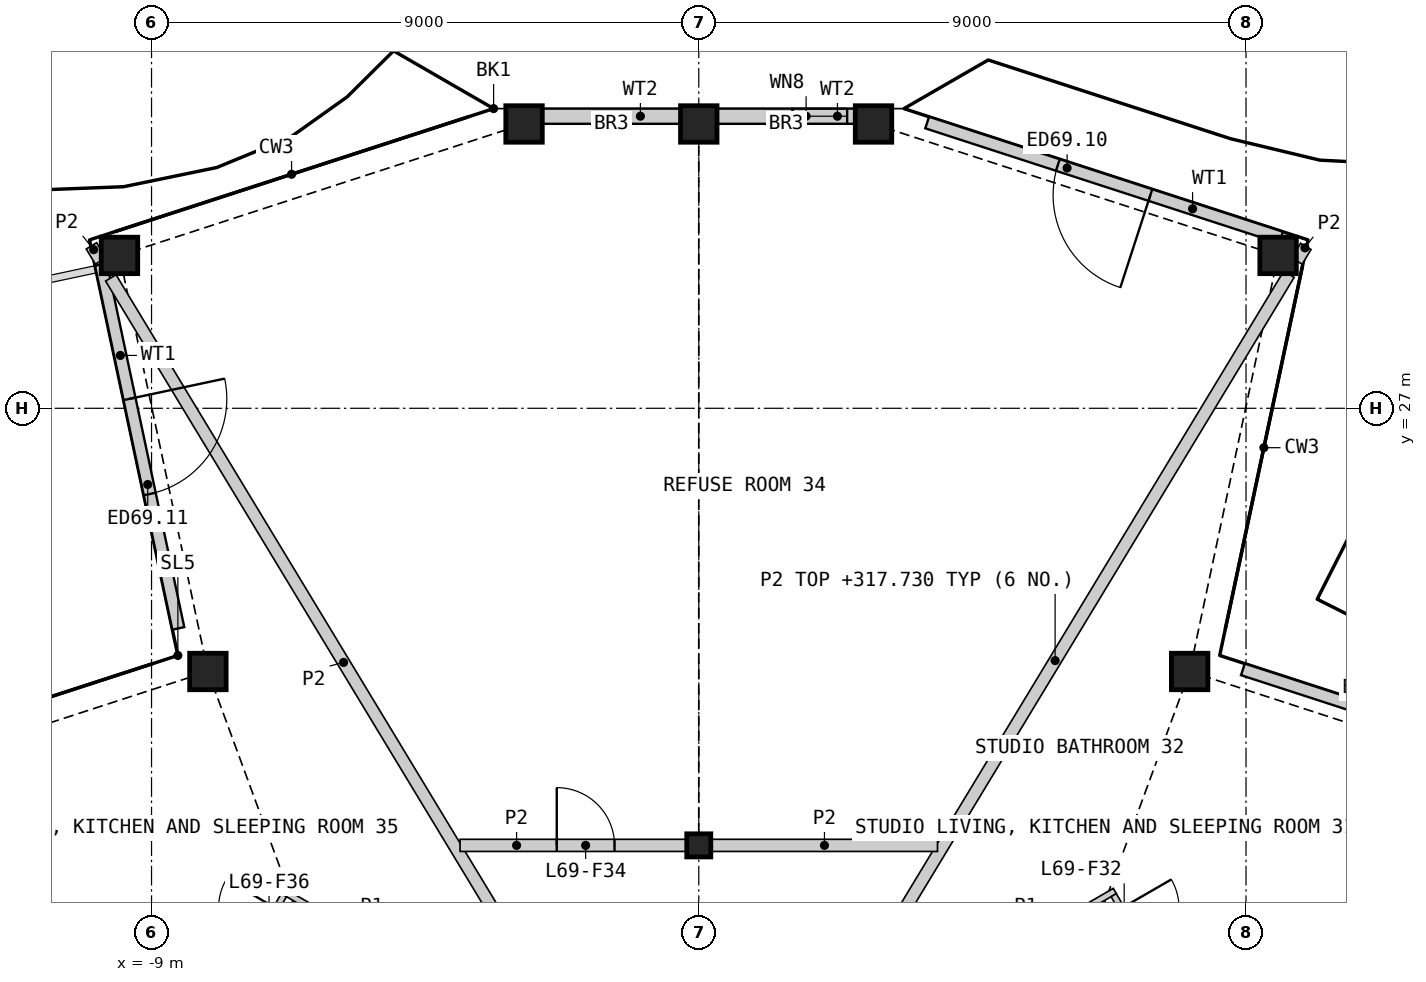
"""IFC4 building model, lengths in metres.
Left out: names, types, materials, properties, quantities, classifications, styles, units other than length and angle.
Written with IfcOpenShell. Run it as: python <this file> out.ifc"""

import sys

from ifc_helpers import new_model, si_unit, direction, frame, frame_2d, origin, origin_2d, place, context, subcontext, project, spatial, rectangle, hollow_rectangle, i_section, extrude, element, fill, save


model = new_model("IFC4")
c1 = context("Model", 3, precision=1e-05, world=origin(), true_north=direction((0.0, 1.0)))
c2 = subcontext(c1, "Body", "Model", "MODEL_VIEW")
j1 = project(units=[si_unit("LENGTHUNIT", "METRE"), si_unit("PLANEANGLEUNIT", "RADIAN")], contexts=[c1])
p1 = place(None, origin())
s1 = spatial("IfcSite", under=j1, at=p1, CompositionType="ELEMENT")
p2 = place(p1, origin())
s2 = spatial("IfcBuilding", under=s1, at=p2, CompositionType="ELEMENT")
p3 = place(p2, frame((0.0, 0.0, 315.4)))
s3 = spatial("IfcBuildingStorey", under=s2, at=p3, CompositionType="ELEMENT", Elevation=315.4)
for number, where, z_axis, x_axis in (
    (1, (8.073, 22.671, 0.0), (0.0, 0.0, 1.0), (1.0, 0.0, 0.0)),
    (2, (9.527, 29.514, 0.0), (0.0, 0.0, 1.0), (1.0, 0.0, 0.0)),
    (3, (2.874, 31.676, 0.0), (0.0, 0.0, 1.0), (1.0, 0.0, 0.0)),
    (4, (0.0, 31.676, 0.0), (0.0, 0.0, 1.0), (1.0, 0.0, 0.0)),
    (5, (-2.874, 31.676, 0.0), (0.0, 0.0, 1.0), (1.0, 0.0, 0.0)),
    (6, (-9.527, 29.514, 0.0), (0.0, 0.0, 1.0), (1.0, 0.0, 0.0)),
    (7, (-8.073, 22.671, 0.0), (0.0, 0.0, 1.0), (1.0, 0.0, 0.0)),
):
    element("IfcColumn", number, at=place(p3, frame(where, z_axis=z_axis, x_axis=x_axis)), inside=s3, PredefinedType="COLUMN", context=c2, shape_type="SweptSolid", body=[
        extrude(hollow_rectangle(XDim=0.6, YDim=0.6, WallThickness=0.04, at=origin_2d()), origin(), (0.0, 0.0, 1.0), 3.4),
    ])
p4 = place(p3, frame((0.0, 19.811, 0.0), z_axis=(0.0, 0.0, 1.0), x_axis=(1.0, 0.0, 0.0)))
e8 = element("IfcColumn", 8, at=p4, inside=s3, PredefinedType="COLUMN", context=c2, shape_type="SweptSolid", body=[
    extrude(i_section(OverallWidth=0.396, OverallDepth=0.381, WebThickness=0.019, FlangeThickness=0.03, at=origin_2d()), origin(), (0.0, 0.0, 1.0), 3.4),
])
p5 = place(p3, frame((14.769, 20.814, 0.0), z_axis=(0.0, 0.0, 1.0), x_axis=(-0.951069243123, 0.308977822483, 0.0)))
e9 = element("IfcWall", 9, at=p5, inside=s3, PredefinedType="SOLIDWALL", context=c2, shape_type="SweptSolid", body=[
    extrude(rectangle(XDim=6.12, YDim=0.2, at=frame_2d((3.06, 0.0))), origin(), (0.0, 0.0, 1.0), 2.488),
])
p6 = place(p5, frame((2.26, 0.0, 0.0)))
e10 = element("IfcOpeningElement", 10, at=p6, cuts=e9, PredefinedType="OPENING", context=c2, shape_type="SweptSolid", body=[
    extrude(rectangle(XDim=1.6, YDim=2.25, at=frame_2d((0.8, 1.125))), frame((0.0, 0.11, 0.0), z_axis=(0.0, -1.0, 0.0), x_axis=(1.0, 0.0, 0.0)), (0.0, 0.0, 1.0), 0.22),
])
p7 = place(p3, frame((9.576, 29.809, 0.0), z_axis=(0.0, 0.0, 1.0), x_axis=(-0.951053709789, 0.309025631781, 0.0)))
e11 = element("IfcWall", 11, at=p7, inside=s3, PredefinedType="SOLIDWALL", context=c2, shape_type="SweptSolid", body=[
    extrude(rectangle(XDim=6.12, YDim=0.2, at=frame_2d((3.06, 0.0))), origin(), (0.0, 0.0, 1.0), 2.488),
])
p8 = place(p7, frame((2.26, 0.0, 0.0)))
e12 = element("IfcOpeningElement", 12, at=p8, cuts=e11, PredefinedType="OPENING", context=c2, shape_type="SweptSolid", body=[
    extrude(rectangle(XDim=1.6, YDim=2.25, at=frame_2d((0.8, 1.125))), frame((0.0, 0.11, 0.0), z_axis=(0.0, -1.0, 0.0), x_axis=(1.0, 0.0, 0.0)), (0.0, 0.0, 1.0), 0.22),
])
p9 = place(p3, frame((2.94, 31.804, 0.0), z_axis=(0.0, 0.0, 1.0), x_axis=(-1.0, 0.0, 0.0)))
e13 = element("IfcWall", 13, at=p9, inside=s3, PredefinedType="SOLIDWALL", context=c2, shape_type="SweptSolid", body=[
    extrude(rectangle(XDim=2.64, YDim=0.25, at=frame_2d((1.32, 0.0))), origin(), (0.0, 0.0, 1.0), 2.488),
])
p10 = place(p9, frame((0.5, 0.0, 1.5)))
e14 = element("IfcOpeningElement", 14, at=p10, cuts=e13, PredefinedType="OPENING", context=c2, shape_type="SweptSolid", body=[
    extrude(rectangle(XDim=0.9, YDim=0.7, at=frame_2d((0.45, 0.35))), frame((0.0, 0.135, 0.0), z_axis=(0.0, -1.0, 0.0), x_axis=(1.0, 0.0, 0.0)), (0.0, 0.0, 1.0), 0.27),
])
p11 = place(p3, frame((-0.3, 31.804, 0.0), z_axis=(0.0, 0.0, 1.0), x_axis=(-1.0, 0.0, 0.0)))
e15 = element("IfcWall", 15, at=p11, inside=s3, PredefinedType="SOLIDWALL", context=c2, shape_type="SweptSolid", body=[
    extrude(rectangle(XDim=2.64, YDim=0.25, at=frame_2d((1.32, 0.0))), origin(), (0.0, 0.0, 1.0), 2.488),
])
p12 = place(p3, frame((-9.832, 29.366, 0.0), z_axis=(0.0, 0.0, 1.0), x_axis=(0.207932234858, -0.978143233738, 0.0)))
e16 = element("IfcWall", 16, at=p12, inside=s3, PredefinedType="SOLIDWALL", context=c2, shape_type="SweptSolid", body=[
    extrude(rectangle(XDim=6.12, YDim=0.2, at=frame_2d((3.06, 0.0))), origin(), (0.0, 0.0, 1.0), 2.488),
])
p13 = place(p12, frame((2.26, 0.0, 0.0)))
e17 = element("IfcOpeningElement", 17, at=p13, cuts=e16, PredefinedType="OPENING", context=c2, shape_type="SweptSolid", body=[
    extrude(rectangle(XDim=1.6, YDim=2.25, at=frame_2d((0.8, 1.125))), frame((0.0, 0.11, 0.0), z_axis=(0.0, -1.0, 0.0), x_axis=(1.0, 0.0, 0.0)), (0.0, 0.0, 1.0), 0.22),
])
p14 = place(p3, frame((3.472, 13.997, 0.0), z_axis=(0.0, 0.0, 1.0), x_axis=(0.866029233976, 0.499993365855, 0.0)))
e18 = element("IfcWall", 18, at=p14, inside=s3, PredefinedType="PARTITIONING", context=c2, shape_type="SweptSolid", body=[
    extrude(rectangle(XDim=12.637, YDim=0.25, at=frame_2d((6.319, 0.0))), origin(), (0.0, 0.0, 1.0), 2.33),
])
p15 = place(p3, frame((-14.417, 20.316, 0.0), z_axis=(0.0, 0.0, 1.0), x_axis=(0.866022207469, -0.50000553614, 0.0)))
e19 = element("IfcWall", 19, at=p15, inside=s3, PredefinedType="PARTITIONING", context=c2, shape_type="SweptSolid", body=[
    extrude(rectangle(XDim=7.042, YDim=0.25, at=frame_2d((3.521, 0.0))), origin(), (0.0, 0.0, 1.0), 2.33),
])
p16 = place(p3, frame((2.015, 16.497, 0.0), z_axis=(0.0, 0.0, 1.0), x_axis=(0.517779253395, 0.855514257482, 0.0)))
e20 = element("IfcWall", 20, at=p16, inside=s3, PredefinedType="PARTITIONING", context=c2, shape_type="SweptSolid", body=[
    extrude(rectangle(XDim=14.854, YDim=0.2, at=frame_2d((7.427, 0.0))), origin(), (0.0, 0.0, 1.0), 2.33),
])
p17 = place(p3, frame((-9.669, 29.144, 0.0), z_axis=(0.0, 0.0, 1.0), x_axis=(0.517770554559, -0.85551952218, 0.0)))
e21 = element("IfcWall", 21, at=p17, inside=s3, PredefinedType="PARTITIONING", context=c2, shape_type="SweptSolid", body=[
    extrude(rectangle(XDim=14.784, YDim=0.2, at=frame_2d((7.392, 0.0))), origin(), (0.0, 0.0, 1.0), 2.33),
])
p18 = place(p3, frame((-3.926, 19.811, 0.0), z_axis=(0.0, 0.0, 1.0), x_axis=(1.0, 0.0, 0.0)))
e22 = element("IfcWall", 22, at=p18, inside=s3, PredefinedType="PARTITIONING", context=c2, shape_type="SweptSolid", body=[
    extrude(rectangle(XDim=3.718, YDim=0.2, at=frame_2d((1.859, 0.0))), origin(), (0.0, 0.0, 1.0), 2.33),
])
p19 = place(p18, frame((1.59, 0.0, 0.0)))
e23 = element("IfcOpeningElement", 23, at=p19, cuts=e22, PredefinedType="OPENING", context=c2, shape_type="SweptSolid", body=[
    extrude(rectangle(XDim=0.95, YDim=2.1, at=frame_2d((0.475, 1.05))), frame((0.0, 0.11, 0.0), z_axis=(0.0, -1.0, 0.0), x_axis=(1.0, 0.0, 0.0)), (0.0, 0.0, 1.0), 0.22),
])
p20 = place(p3, frame((0.208, 19.811, 0.0), z_axis=(0.0, 0.0, 1.0), x_axis=(1.0, 0.0, 0.0)))
e24 = element("IfcWall", 24, at=p20, inside=s3, PredefinedType="PARTITIONING", context=c2, shape_type="SweptSolid", body=[
    extrude(rectangle(XDim=3.718, YDim=0.2, at=frame_2d((1.859, 0.0))), origin(), (0.0, 0.0, 1.0), 2.33),
])
p21 = place(p3, frame((-9.989, 29.672, 0.0), z_axis=(0.0, 0.0, 1.0), x_axis=(0.517931387916, -0.855422163268, 0.0)))
e25 = element("IfcWall", 25, at=p21, inside=s3, PredefinedType="PARTITIONING", context=c2, shape_type="SweptSolid", body=[
    extrude(rectangle(XDim=0.292, YDim=0.2, at=frame_2d((0.146, 0.0))), origin(), (0.0, 0.0, 1.0), 2.33),
])
p22 = place(p3, frame((9.837, 29.422, 0.0), z_axis=(0.0, 0.0, 1.0), x_axis=(0.517419338909, 0.855731983581, 0.0)))
e26 = element("IfcWall", 26, at=p22, inside=s3, PredefinedType="PARTITIONING", context=c2, shape_type="SweptSolid", body=[
    extrude(rectangle(XDim=0.282, YDim=0.2, at=frame_2d((0.141, 0.0))), origin(), (0.0, 0.0, 1.0), 2.33),
])
for number, where, z_axis, x_axis in (
    (27, (4.417, 17.66, 0.0), (0.0, 0.0, 1.0), (0.866, 0.5, 0.0)),
    (28, (-6.842, 19.06, 0.0), (0.0, 0.0, 1.0), (0.866, -0.5, 0.0)),
):
    element("IfcWall", number, at=place(p3, frame(where, z_axis=z_axis, x_axis=x_axis)), inside=s3, PredefinedType="PARTITIONING", context=c2, shape_type="SweptSolid", body=[
        extrude(rectangle(XDim=2.8, YDim=0.1, at=frame_2d((1.4, 0.0))), origin(), (0.0, 0.0, 1.0), 2.33),
    ])
p23 = place(p3, frame((6.824, 18.992, 0.0), z_axis=(0.0, 0.0, 1.0), x_axis=(0.50001820224, -0.866014894461, 0.0)))
e29 = element("IfcWall", 29, at=p23, inside=s3, PredefinedType="PARTITIONING", context=c2, shape_type="SweptSolid", body=[
    extrude(rectangle(XDim=2.525, YDim=0.1, at=frame_2d((1.262, 0.0))), origin(), (0.0, 0.0, 1.0), 2.33),
])
p24 = place(p23, frame((0.25, 0.0, 0.0)))
e30 = element("IfcOpeningElement", 30, at=p24, cuts=e29, PredefinedType="OPENING", context=c2, shape_type="SweptSolid", body=[
    extrude(rectangle(XDim=0.95, YDim=2.1, at=frame_2d((0.475, 1.05))), frame((0.0, 0.06, 0.0), z_axis=(0.0, -1.0, 0.0), x_axis=(1.0, 0.0, 0.0)), (0.0, 0.0, 1.0), 0.12),
])
p25 = place(p3, frame((-8.086, 16.805, 0.0), z_axis=(0.0, 0.0, 1.0), x_axis=(0.50001820224, 0.866014894461, 0.0)))
e31 = element("IfcWall", 31, at=p25, inside=s3, PredefinedType="PARTITIONING", context=c2, shape_type="SweptSolid", body=[
    extrude(rectangle(XDim=2.525, YDim=0.1, at=frame_2d((1.262, 0.0))), origin(), (0.0, 0.0, 1.0), 2.33),
])
p26 = place(p25, frame((1.325, 0.0, 0.0)))
e32 = element("IfcOpeningElement", 32, at=p26, cuts=e31, PredefinedType="OPENING", context=c2, shape_type="SweptSolid", body=[
    extrude(rectangle(XDim=0.95, YDim=2.1, at=frame_2d((0.475, 1.05))), frame((0.0, 0.06, 0.0), z_axis=(0.0, -1.0, 0.0), x_axis=(1.0, 0.0, 0.0)), (0.0, 0.0, 1.0), 0.12),
])
p27 = place(p8, origin())
e33 = element("IfcDoor", 33, at=p27, inside=s3, OperationType="DOUBLE_DOOR_SINGLE_SWING", PredefinedType="DOOR", context=c2, shape_type="SweptSolid", body=[
    extrude(rectangle(XDim=1.6, YDim=2.25, at=frame_2d((0.8, 1.125))), frame((0.0, 0.025, 0.0), z_axis=(0.0, -1.0, 0.0), x_axis=(1.0, 0.0, 0.0)), (0.0, 0.0, 1.0), 0.05),
])
fill(e12, e33)
p28 = place(p10, origin())
e34 = element("IfcWindow", 34, at=p28, inside=s3, PartitioningType="SINGLE_PANEL", PredefinedType="WINDOW", context=c2, shape_type="SweptSolid", body=[
    extrude(rectangle(XDim=0.9, YDim=0.7, at=frame_2d((0.45, 0.35))), frame((0.0, 0.03, 0.0), z_axis=(0.0, -1.0, 0.0), x_axis=(1.0, 0.0, 0.0)), (0.0, 0.0, 1.0), 0.06),
])
fill(e14, e34)
p29 = place(p13, origin())
e35 = element("IfcDoor", 35, at=p29, inside=s3, OperationType="DOUBLE_DOOR_SINGLE_SWING", PredefinedType="DOOR", context=c2, shape_type="SweptSolid", body=[
    extrude(rectangle(XDim=1.6, YDim=2.25, at=frame_2d((0.8, 1.125))), frame((0.0, 0.025, 0.0), z_axis=(0.0, -1.0, 0.0), x_axis=(1.0, 0.0, 0.0)), (0.0, 0.0, 1.0), 0.05),
])
fill(e17, e35)
p30 = place(p19, origin())
e36 = element("IfcDoor", 36, at=p30, inside=s3, OperationType="SINGLE_SWING_LEFT", PredefinedType="DOOR", context=c2, shape_type="SweptSolid", body=[
    extrude(rectangle(XDim=0.95, YDim=2.1, at=frame_2d((0.475, 1.05))), frame((0.0, 0.025, 0.0), z_axis=(0.0, -1.0, 0.0), x_axis=(1.0, 0.0, 0.0)), (0.0, 0.0, 1.0), 0.05),
])
fill(e23, e36)
save(model, sys.argv[1])
